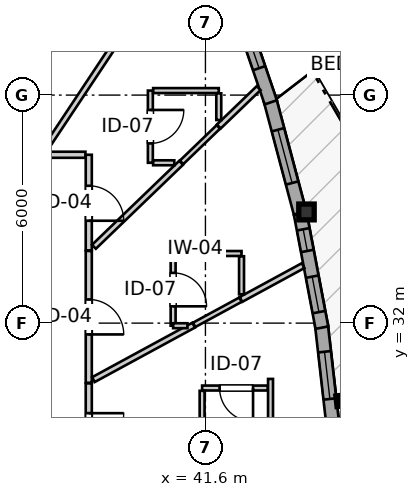
"""IFC4 building model, lengths in metres.
Left out: names, types, materials, properties, quantities, classifications, styles, units other than length and angle.
Written with IfcOpenShell. Run it as: python <this file> out.ifc"""

import sys

from ifc_helpers import new_model, si_unit, direction, frame, frame_2d, origin, origin_2d, place, context, subcontext, project, spatial, rectangle, i_section, extrude, source, transform, mapped, element, fill, save


model = new_model("IFC4")
c1 = context("Model", 3, precision=1e-05, world=origin(), true_north=direction((0.0, 1.0)))
c2 = subcontext(c1, "Body", "Model", "MODEL_VIEW")
j1 = project(units=[si_unit("LENGTHUNIT", "METRE"), si_unit("PLANEANGLEUNIT", "RADIAN")], contexts=[c1])
p1 = place(None, origin())
s1 = spatial("IfcSite", under=j1, at=p1, CompositionType="ELEMENT")
p2 = place(p1, origin())
s2 = spatial("IfcBuilding", under=s1, at=p2, CompositionType="ELEMENT")
p3 = place(p2, frame((0.0, 0.0, 108.8)))
s3 = spatial("IfcBuildingStorey", under=s2, at=p3, CompositionType="ELEMENT", Elevation=108.8)
m1 = source(origin(), c2, "Body", "SweptSolid", [
    extrude(i_section(OverallWidth=0.406, OverallDepth=0.416, WebThickness=0.027, FlangeThickness=0.044, FilletRadius=0.015, at=origin_2d()), origin(), (0.0, 0.0, 1.0), 2.935),
])
p4 = place(p3, frame((44.259, 34.925, 0.0), z_axis=(0.0, 0.0, 1.0), x_axis=(1.0, 0.0, 0.0)))
e1 = element("IfcColumn", 1, at=p4, inside=s3, PredefinedType="PILASTER", context=c2, shape_type="MappedRepresentation", body=[
    mapped(m1, transform((0.0, 0.0, 0.0), x_axis=(1.0, 0.0, 0.0), y_axis=(0.0, 1.0, 0.0), z_axis=(0.0, 0.0, 1.0), scale=1.0)),
])
p5 = place(p3, frame((44.968, 29.184, 0.0), z_axis=(0.0, 0.0, 1.0), x_axis=(-0.113251751131, 0.993566324342, 0.0)))
e2 = element("IfcWall", 2, at=p5, inside=s3, PredefinedType="SOLIDWALL", context=c2, shape_type="SweptSolid", body=[
    extrude(rectangle(XDim=2.802, YDim=0.34, at=frame_2d((1.401, 0.0))), origin(), (0.0, 0.0, 1.0), 2.465),
])
p6 = place(p5, frame((0.826, 0.0, 0.82)))
e3 = element("IfcOpeningElement", 3, at=p6, cuts=e2, PredefinedType="OPENING", context=c2, shape_type="SweptSolid", body=[
    extrude(rectangle(XDim=1.25, YDim=1.35, at=frame_2d((0.625, 0.675))), frame((0.0, 0.18, 0.0), z_axis=(0.0, -1.0, 0.0), x_axis=(1.0, 0.0, 0.0)), (0.0, 0.0, 1.0), 0.36),
])
p7 = place(p3, frame((44.664, 31.881, 0.0), z_axis=(0.0, 0.0, 1.0), x_axis=(-0.18665909876, 0.982424745642, 0.0)))
e4 = element("IfcWall", 4, at=p7, inside=s3, PredefinedType="SOLIDWALL", context=c2, shape_type="SweptSolid", body=[
    extrude(rectangle(XDim=3.046, YDim=0.34, at=frame_2d((1.523, 0.0))), origin(), (0.0, 0.0, 1.0), 2.465),
])
p8 = place(p7, frame((0.416, 0.0, 0.82)))
e5 = element("IfcOpeningElement", 5, at=p8, cuts=e4, PredefinedType="OPENING", context=c2, shape_type="SweptSolid", body=[
    extrude(rectangle(XDim=0.95, YDim=1.35, at=frame_2d((0.475, 0.675))), frame((0.0, 0.18, 0.0), z_axis=(0.0, -1.0, 0.0), x_axis=(1.0, 0.0, 0.0)), (0.0, 0.0, 1.0), 0.36),
])
p9 = place(p7, frame((2.054, 0.0, 0.82)))
e6 = element("IfcOpeningElement", 6, at=p9, cuts=e4, PredefinedType="OPENING", context=c2, shape_type="SweptSolid", body=[
    extrude(rectangle(XDim=0.58, YDim=1.35, at=frame_2d((0.29, 0.675))), frame((0.0, 0.18, 0.0), z_axis=(0.0, -1.0, 0.0), x_axis=(1.0, 0.0, 0.0)), (0.0, 0.0, 1.0), 0.36),
])
p10 = place(p3, frame((44.09, 34.901, 0.0), z_axis=(0.0, 0.0, 1.0), x_axis=(-0.257108087637, 0.966382652613, 0.0)))
e7 = element("IfcWall", 7, at=p10, inside=s3, PredefinedType="SOLIDWALL", context=c2, shape_type="SweptSolid", body=[
    extrude(rectangle(XDim=3.096, YDim=0.34, at=frame_2d((1.548, 0.0))), origin(), (0.0, 0.0, 1.0), 2.465),
])
p11 = place(p10, frame((0.813, 0.0, 0.82)))
e8 = element("IfcOpeningElement", 8, at=p11, cuts=e7, PredefinedType="OPENING", context=c2, shape_type="SweptSolid", body=[
    extrude(rectangle(XDim=1.45, YDim=1.25, at=frame_2d((0.725, 0.625))), frame((0.0, 0.18, 0.0), z_axis=(0.0, -1.0, 0.0), x_axis=(1.0, 0.0, 0.0)), (0.0, 0.0, 1.0), 0.36),
])
p12 = place(p3, frame((43.319, 37.809, 0.0), z_axis=(0.0, 0.0, 1.0), x_axis=(-0.323586371726, 0.946198636669, 0.0)))
e9 = element("IfcWall", 9, at=p12, inside=s3, PredefinedType="SOLIDWALL", context=c2, shape_type="SweptSolid", body=[
    extrude(rectangle(XDim=2.952, YDim=0.34, at=frame_2d((1.476, 0.0))), origin(), (0.0, 0.0, 1.0), 2.465),
])
p13 = place(p12, frame((0.949, 0.0, 0.82)))
e10 = element("IfcOpeningElement", 10, at=p13, cuts=e9, PredefinedType="OPENING", context=c2, shape_type="SweptSolid", body=[
    extrude(rectangle(XDim=1.45, YDim=1.25, at=frame_2d((0.725, 0.625))), frame((0.0, 0.18, 0.0), z_axis=(0.0, -1.0, 0.0), x_axis=(1.0, 0.0, 0.0)), (0.0, 0.0, 1.0), 0.36),
])
p14 = place(p3, frame((38.53, 33.899, 0.0), z_axis=(0.0, 0.0, 1.0), x_axis=(0.0, -1.0, 0.0)))
e11 = element("IfcWall", 11, at=p14, inside=s3, PredefinedType="PARTITIONING", context=c2, shape_type="SweptSolid", body=[
    extrude(rectangle(XDim=3.469, YDim=0.16, at=frame_2d((1.734, 0.0))), origin(), (0.0, 0.0, 1.0), 2.935),
])
p15 = place(p14, frame((1.277, 0.0, 0.0)))
e12 = element("IfcOpeningElement", 12, at=p15, cuts=e11, PredefinedType="OPENING", context=c2, shape_type="SweptSolid", body=[
    extrude(rectangle(XDim=0.92, YDim=2.1, at=frame_2d((0.46, 1.05))), frame((0.0, 0.09, 0.0), z_axis=(0.0, -1.0, 0.0), x_axis=(1.0, 0.0, 0.0)), (0.0, 0.0, 1.0), 0.18),
])
p16 = place(p3, frame((38.53, 30.415, 0.0), z_axis=(0.0, 0.0, 1.0), x_axis=(0.0, -1.0, 0.0)))
e13 = element("IfcWall", 13, at=p16, inside=s3, PredefinedType="PARTITIONING", context=c2, shape_type="SweptSolid", body=[
    extrude(rectangle(XDim=2.536, YDim=0.16, at=frame_2d((1.268, 0.0))), origin(), (0.0, 0.0, 1.0), 2.935),
])
p17 = place(p16, frame((0.784, 0.0, 0.0)))
e14 = element("IfcOpeningElement", 14, at=p17, cuts=e13, PredefinedType="OPENING", context=c2, shape_type="SweptSolid", body=[
    extrude(rectangle(XDim=0.92, YDim=2.1, at=frame_2d((0.46, 1.05))), frame((0.0, 0.09, 0.0), z_axis=(0.0, -1.0, 0.0), x_axis=(1.0, 0.0, 0.0)), (0.0, 0.0, 1.0), 0.18),
])
p18 = place(p3, frame((38.53, 36.43, 0.0), z_axis=(0.0, 0.0, 1.0), x_axis=(0.0, -1.0, 0.0)))
e15 = element("IfcWall", 15, at=p18, inside=s3, PredefinedType="PARTITIONING", context=c2, shape_type="SweptSolid", body=[
    extrude(rectangle(XDim=2.516, YDim=0.16, at=frame_2d((1.258, 0.0))), origin(), (0.0, 0.0, 1.0), 2.573),
])
p19 = place(p18, frame((0.816, 0.0, 0.0)))
e16 = element("IfcOpeningElement", 16, at=p19, cuts=e15, PredefinedType="OPENING", context=c2, shape_type="SweptSolid", body=[
    extrude(rectangle(XDim=0.92, YDim=2.1, at=frame_2d((0.46, 1.05))), frame((0.0, 0.09, 0.0), z_axis=(0.0, -1.0, 0.0), x_axis=(1.0, 0.0, 0.0)), (0.0, 0.0, 1.0), 0.18),
])
p20 = place(p3, frame((40.75, 33.832, 0.0), z_axis=(0.0, 0.0, 1.0), x_axis=(0.0, -1.0, 0.0)))
e17 = element("IfcWall", 17, at=p20, inside=s3, PredefinedType="PARTITIONING", context=c2, shape_type="SweptSolid", body=[
    extrude(rectangle(XDim=1.9, YDim=0.13, at=frame_2d((0.95, 0.0))), origin(), (0.0, 0.0, 1.0), 2.935),
])
p21 = place(p20, frame((0.51, 0.0, 0.0)))
e18 = element("IfcOpeningElement", 18, at=p21, cuts=e17, PredefinedType="OPENING", context=c2, shape_type="SweptSolid", body=[
    extrude(rectangle(XDim=0.88, YDim=2.05, at=frame_2d((0.44, 1.025))), frame((0.0, 0.075, 0.0), z_axis=(0.0, -1.0, 0.0), x_axis=(1.0, 0.0, 0.0)), (0.0, 0.0, 1.0), 0.15),
])
p22 = place(p3, frame((40.151, 38.119, 0.0), z_axis=(0.0, 0.0, 1.0), x_axis=(0.0, -1.0, 0.0)))
e19 = element("IfcWall", 19, at=p22, inside=s3, PredefinedType="PARTITIONING", context=c2, shape_type="SweptSolid", body=[
    extrude(rectangle(XDim=1.9, YDim=0.13, at=frame_2d((0.95, 0.0))), origin(), (0.0, 0.0, 1.0), 2.935),
])
p23 = place(p22, frame((0.51, 0.0, 0.0)))
e20 = element("IfcOpeningElement", 20, at=p23, cuts=e19, PredefinedType="OPENING", context=c2, shape_type="SweptSolid", body=[
    extrude(rectangle(XDim=0.88, YDim=2.05, at=frame_2d((0.44, 1.025))), frame((0.0, 0.075, 0.0), z_axis=(0.0, -1.0, 0.0), x_axis=(1.0, 0.0, 0.0)), (0.0, 0.0, 1.0), 0.15),
])
p24 = place(p3, frame((43.24, 30.292, 0.0), z_axis=(0.0, 0.0, 1.0), x_axis=(-1.0, 0.0, 0.0)))
e21 = element("IfcWall", 21, at=p24, inside=s3, PredefinedType="PARTITIONING", context=c2, shape_type="SweptSolid", body=[
    extrude(rectangle(XDim=1.727, YDim=0.13, at=frame_2d((0.864, 0.0))), origin(), (0.0, 0.0, 1.0), 2.935),
])
p25 = place(p24, frame((0.387, 0.0, 0.0)))
e22 = element("IfcOpeningElement", 22, at=p25, cuts=e21, PredefinedType="OPENING", context=c2, shape_type="SweptSolid", body=[
    extrude(rectangle(XDim=0.88, YDim=2.05, at=frame_2d((0.44, 1.025))), frame((0.0, 0.075, 0.0), z_axis=(0.0, -1.0, 0.0), x_axis=(1.0, 0.0, 0.0)), (0.0, 0.0, 1.0), 0.15),
])
p26 = place(p3, frame((35.191, 36.548, 0.0), z_axis=(0.0, 0.0, 1.0), x_axis=(0.417154036681, 0.908835799075, 0.0)))
e23 = element("IfcWall", 23, at=p26, inside=s3, PredefinedType="PARTITIONING", context=c2, shape_type="SweptSolid", body=[
    extrude(rectangle(XDim=9.949, YDim=0.145, at=frame_2d((4.974, 0.0))), origin(), (0.0, 0.0, 1.0), 2.935),
])
p27 = place(p3, frame((37.366, 36.557, 0.0), z_axis=(0.0, 0.0, 1.0), x_axis=(0.553463679146, 0.832873313215, 0.0)))
e24 = element("IfcWall", 24, at=p27, inside=s3, PredefinedType="PARTITIONING", context=c2, shape_type="SweptSolid", body=[
    extrude(rectangle(XDim=7.704, YDim=0.145, at=frame_2d((3.852, 0.0))), origin(), (0.0, 0.0, 1.0), 2.935),
])
p28 = place(p3, frame((38.666, 34.009, 0.0), z_axis=(0.0, 0.0, 1.0), x_axis=(0.72031454127, 0.693647577402, 0.0)))
e25 = element("IfcWall", 25, at=p28, inside=s3, PredefinedType="PARTITIONING", context=c2, shape_type="SweptSolid", body=[
    extrude(rectangle(XDim=3.186, YDim=0.145, at=frame_2d((1.593, 0.0))), origin(), (0.0, 0.0, 1.0), 2.935),
])
p29 = place(p3, frame((38.652, 30.513, 0.0), z_axis=(0.0, 0.0, 1.0), x_axis=(0.878637115469, 0.47749012484, 0.0)))
e26 = element("IfcWall", 26, at=p29, inside=s3, PredefinedType="PARTITIONING", context=c2, shape_type="SweptSolid", body=[
    extrude(rectangle(XDim=3.003, YDim=0.145, at=frame_2d((1.501, 0.0))), origin(), (0.0, 0.0, 1.0), 2.935),
])
p30 = place(p3, frame((42.535, 32.624, 0.0), z_axis=(0.0, 0.0, 1.0), x_axis=(0.878631690287, 0.477500107669, 0.0)))
e27 = element("IfcWall", 27, at=p30, inside=s3, PredefinedType="PARTITIONING", context=c2, shape_type="SweptSolid", body=[
    extrude(rectangle(XDim=1.861, YDim=0.145, at=frame_2d((0.93, 0.0))), origin(), (0.0, 0.0, 1.0), 2.935),
])
p31 = place(p3, frame((40.224, 38.119, 0.0), z_axis=(0.0, 0.0, 1.0), x_axis=(1.0, 0.0, 0.0)))
e28 = element("IfcWall", 28, at=p31, inside=s3, PredefinedType="PARTITIONING", context=c2, shape_type="SweptSolid", body=[
    extrude(rectangle(XDim=1.727, YDim=0.13, at=frame_2d((0.863, 0.0))), origin(), (0.0, 0.0, 1.0), 2.935),
])
p32 = place(p3, frame((40.823, 33.832, 0.0), z_axis=(0.0, 0.0, 1.0), x_axis=(1.0, 0.0, 0.0)))
e29 = element("IfcWall", 29, at=p32, inside=s3, PredefinedType="PARTITIONING", context=c2, shape_type="SweptSolid", body=[
    extrude(rectangle(XDim=1.727, YDim=0.13, at=frame_2d((0.864, 0.0))), origin(), (0.0, 0.0, 1.0), 2.935),
])
p33 = place(p3, frame((41.513, 28.683, 0.0), z_axis=(0.0, 0.0, 1.0), x_axis=(0.0, 1.0, 0.0)))
e30 = element("IfcWall", 30, at=p33, inside=s3, PredefinedType="PARTITIONING", context=c2, shape_type="SweptSolid", body=[
    extrude(rectangle(XDim=1.536, YDim=0.13, at=frame_2d((0.768, 0.0))), origin(), (0.0, 0.0, 1.0), 2.935),
])
p34 = place(p3, frame((41.951, 37.173, 0.0), z_axis=(0.0, 0.0, 1.0), x_axis=(0.720559112487, 0.693393514111, 0.0)))
e31 = element("IfcWall", 31, at=p34, inside=s3, PredefinedType="PARTITIONING", context=c2, shape_type="SweptSolid", body=[
    extrude(rectangle(XDim=1.456, YDim=0.145, at=frame_2d((0.728, 0.0))), origin(), (0.0, 0.0, 1.0), 2.935),
])
p35 = place(p3, frame((41.303, 31.954, 0.0), z_axis=(0.0, 0.0, 1.0), x_axis=(0.87855387187, 0.477643270885, 0.0)))
e32 = element("IfcWall", 32, at=p35, inside=s3, PredefinedType="PARTITIONING", context=c2, shape_type="SweptSolid", body=[
    extrude(rectangle(XDim=1.387, YDim=0.13, at=frame_2d((0.694, 0.0))), origin(), (0.0, 0.0, 1.0), 2.935),
])
p36 = place(p3, frame((40.972, 36.229, 0.0), z_axis=(0.0, 0.0, 1.0), x_axis=(0.72014550452, 0.693823069896, 0.0)))
e33 = element("IfcWall", 33, at=p36, inside=s3, PredefinedType="PARTITIONING", context=c2, shape_type="SweptSolid", body=[
    extrude(rectangle(XDim=1.345, YDim=0.13, at=frame_2d((0.672, 0.0))), origin(), (0.0, 0.0, 1.0), 2.935),
])
p37 = place(p3, frame((43.313, 28.762, 0.0), z_axis=(0.0, 0.0, 1.0), x_axis=(0.0, 1.0, 0.0)))
e34 = element("IfcWall", 34, at=p37, inside=s3, PredefinedType="PARTITIONING", context=c2, shape_type="SweptSolid", body=[
    extrude(rectangle(XDim=1.77, YDim=0.13, at=frame_2d((0.885, 0.0))), origin(), (0.0, 0.0, 1.0), 2.935),
])
p38 = place(p3, frame((37.463, 36.43, 0.0), z_axis=(0.0, 0.0, 1.0), x_axis=(1.0, 0.0, 0.0)))
e35 = element("IfcWall", 35, at=p38, inside=s3, PredefinedType="PARTITIONING", context=c2, shape_type="SweptSolid", body=[
    extrude(rectangle(XDim=0.979, YDim=0.16, at=frame_2d((0.489, 0.0))), origin(), (0.0, 0.0, 1.0), 2.573),
])
p39 = place(p3, frame((42.55, 32.758, 0.0), z_axis=(0.0, 0.0, 1.0), x_axis=(0.0, 1.0, 0.0)))
e36 = element("IfcWall", 36, at=p39, inside=s3, PredefinedType="PARTITIONING", context=c2, shape_type="SweptSolid", body=[
    extrude(rectangle(XDim=1.001, YDim=0.13, at=frame_2d((0.5, 0.0))), origin(), (0.0, 0.0, 1.0), 2.935),
])
p40 = place(p3, frame((41.951, 37.344, 0.0), z_axis=(0.0, 0.0, 1.0), x_axis=(0.0, 1.0, 0.0)))
e37 = element("IfcWall", 37, at=p40, inside=s3, PredefinedType="PARTITIONING", context=c2, shape_type="SweptSolid", body=[
    extrude(rectangle(XDim=0.702, YDim=0.13, at=frame_2d((0.351, 0.0))), origin(), (0.0, 0.0, 1.0), 2.935),
])
p41 = place(p3, frame((40.224, 36.219, 0.0), z_axis=(0.0, 0.0, 1.0), x_axis=(1.0, 0.0, 0.0)))
e38 = element("IfcWall", 38, at=p41, inside=s3, PredefinedType="PARTITIONING", context=c2, shape_type="SweptSolid", body=[
    extrude(rectangle(XDim=0.557, YDim=0.13, at=frame_2d((0.278, 0.0))), origin(), (0.0, 0.0, 1.0), 2.935),
])
p42 = place(p3, frame((40.75, 31.932, 0.0), z_axis=(0.0, 0.0, 1.0), x_axis=(1.0, 0.0, 0.0)))
e39 = element("IfcWall", 39, at=p42, inside=s3, PredefinedType="PARTITIONING", context=c2, shape_type="SweptSolid", body=[
    extrude(rectangle(XDim=0.377, YDim=0.13, at=frame_2d((0.188, 0.0))), origin(), (0.0, 0.0, 1.0), 2.935),
])
m2 = source(origin(), c2, "Body", "SweptSolid", [
    extrude(rectangle(XDim=1.25, YDim=1.35, at=frame_2d((0.625, 0.675))), frame((0.0, 0.03, 0.0), z_axis=(0.0, -1.0, 0.0), x_axis=(1.0, 0.0, 0.0)), (0.0, 0.0, 1.0), 0.06),
])
p43 = place(p6, origin())
e40 = element("IfcWindow", 40, at=p43, inside=s3, PartitioningType="SINGLE_PANEL", PredefinedType="WINDOW", context=c2, shape_type="MappedRepresentation", body=[
    mapped(m2, transform((0.0, 0.0, 0.0), x_axis=(1.0, 0.0, 0.0), y_axis=(0.0, 1.0, 0.0), z_axis=(0.0, 0.0, 1.0), scale=1.0)),
])
fill(e3, e40)
m3 = source(origin(), c2, "Body", "SweptSolid", [
    extrude(rectangle(XDim=0.95, YDim=1.35, at=frame_2d((0.475, 0.675))), frame((0.0, 0.03, 0.0), z_axis=(0.0, -1.0, 0.0), x_axis=(1.0, 0.0, 0.0)), (0.0, 0.0, 1.0), 0.06),
])
p44 = place(p8, origin())
e41 = element("IfcWindow", 41, at=p44, inside=s3, PartitioningType="SINGLE_PANEL", PredefinedType="WINDOW", context=c2, shape_type="MappedRepresentation", body=[
    mapped(m3, transform((0.0, 0.0, 0.0), x_axis=(1.0, 0.0, 0.0), y_axis=(0.0, 1.0, 0.0), z_axis=(0.0, 0.0, 1.0), scale=1.0)),
])
fill(e5, e41)
m4 = source(origin(), c2, "Body", "SweptSolid", [
    extrude(rectangle(XDim=0.58, YDim=1.35, at=frame_2d((0.29, 0.675))), frame((0.0, 0.03, 0.0), z_axis=(0.0, -1.0, 0.0), x_axis=(1.0, 0.0, 0.0)), (0.0, 0.0, 1.0), 0.06),
])
p45 = place(p9, origin())
e42 = element("IfcWindow", 42, at=p45, inside=s3, PartitioningType="SINGLE_PANEL", PredefinedType="WINDOW", context=c2, shape_type="MappedRepresentation", body=[
    mapped(m4, transform((0.0, 0.0, 0.0), x_axis=(1.0, 0.0, 0.0), y_axis=(0.0, 1.0, 0.0), z_axis=(0.0, 0.0, 1.0), scale=1.0)),
])
fill(e6, e42)
m5 = source(origin(), c2, "Body", "SweptSolid", [
    extrude(rectangle(XDim=1.45, YDim=1.25, at=frame_2d((0.725, 0.625))), frame((0.0, 0.03, 0.0), z_axis=(0.0, -1.0, 0.0), x_axis=(1.0, 0.0, 0.0)), (0.0, 0.0, 1.0), 0.06),
])
p46 = place(p11, origin())
e43 = element("IfcWindow", 43, at=p46, inside=s3, PartitioningType="SINGLE_PANEL", PredefinedType="WINDOW", context=c2, shape_type="MappedRepresentation", body=[
    mapped(m5, transform((0.0, 0.0, 0.0), x_axis=(1.0, 0.0, 0.0), y_axis=(0.0, 1.0, 0.0), z_axis=(0.0, 0.0, 1.0), scale=1.0)),
])
fill(e8, e43)
p47 = place(p13, origin())
e44 = element("IfcWindow", 44, at=p47, inside=s3, PartitioningType="SINGLE_PANEL", PredefinedType="WINDOW", context=c2, shape_type="MappedRepresentation", body=[
    mapped(m5, transform((0.0, 0.0, 0.0), x_axis=(1.0, 0.0, 0.0), y_axis=(0.0, 1.0, 0.0), z_axis=(0.0, 0.0, 1.0), scale=1.0)),
])
fill(e10, e44)
m6 = source(origin(), c2, "Body", "SweptSolid", [
    extrude(rectangle(XDim=0.92, YDim=2.1, at=frame_2d((0.46, 1.05))), frame((0.0, 0.025, 0.0), z_axis=(0.0, -1.0, 0.0), x_axis=(1.0, 0.0, 0.0)), (0.0, 0.0, 1.0), 0.05),
])
p48 = place(p15, origin())
e45 = element("IfcDoor", 45, at=p48, inside=s3, OperationType="SINGLE_SWING_RIGHT", PredefinedType="DOOR", context=c2, shape_type="MappedRepresentation", body=[
    mapped(m6, transform((0.0, 0.0, 0.0), x_axis=(1.0, 0.0, 0.0), y_axis=(0.0, 1.0, 0.0), z_axis=(0.0, 0.0, 1.0), scale=1.0)),
])
fill(e12, e45)
p49 = place(p17, origin())
e46 = element("IfcDoor", 46, at=p49, inside=s3, OperationType="SINGLE_SWING_LEFT", PredefinedType="DOOR", context=c2, shape_type="MappedRepresentation", body=[
    mapped(m6, transform((0.0, 0.0, 0.0), x_axis=(1.0, 0.0, 0.0), y_axis=(0.0, 1.0, 0.0), z_axis=(0.0, 0.0, 1.0), scale=1.0)),
])
fill(e14, e46)
p50 = place(p19, origin())
e47 = element("IfcDoor", 47, at=p50, inside=s3, OperationType="SINGLE_SWING_RIGHT", PredefinedType="DOOR", context=c2, shape_type="MappedRepresentation", body=[
    mapped(m6, transform((0.0, 0.0, 0.0), x_axis=(1.0, 0.0, 0.0), y_axis=(0.0, 1.0, 0.0), z_axis=(0.0, 0.0, 1.0), scale=1.0)),
])
fill(e16, e47)
m7 = source(origin(), c2, "Body", "SweptSolid", [
    extrude(rectangle(XDim=0.88, YDim=2.05, at=frame_2d((0.44, 1.025))), frame((0.0, 0.025, 0.0), z_axis=(0.0, -1.0, 0.0), x_axis=(1.0, 0.0, 0.0)), (0.0, 0.0, 1.0), 0.05),
])
p51 = place(p21, origin())
e48 = element("IfcDoor", 48, at=p51, inside=s3, OperationType="SINGLE_SWING_RIGHT", PredefinedType="DOOR", context=c2, shape_type="MappedRepresentation", body=[
    mapped(m7, transform((0.0, 0.0, 0.0), x_axis=(1.0, 0.0, 0.0), y_axis=(0.0, 1.0, 0.0), z_axis=(0.0, 0.0, 1.0), scale=1.0)),
])
fill(e18, e48)
p52 = place(p23, origin())
e49 = element("IfcDoor", 49, at=p52, inside=s3, OperationType="SINGLE_SWING_LEFT", PredefinedType="DOOR", context=c2, shape_type="MappedRepresentation", body=[
    mapped(m7, transform((0.0, 0.0, 0.0), x_axis=(1.0, 0.0, 0.0), y_axis=(0.0, 1.0, 0.0), z_axis=(0.0, 0.0, 1.0), scale=1.0)),
])
fill(e20, e49)
p53 = place(p25, origin())
e50 = element("IfcDoor", 50, at=p53, inside=s3, OperationType="SINGLE_SWING_LEFT", PredefinedType="DOOR", context=c2, shape_type="MappedRepresentation", body=[
    mapped(m7, transform((0.0, 0.0, 0.0), x_axis=(1.0, 0.0, 0.0), y_axis=(0.0, 1.0, 0.0), z_axis=(0.0, 0.0, 1.0), scale=1.0)),
])
fill(e22, e50)
save(model, sys.argv[1])
